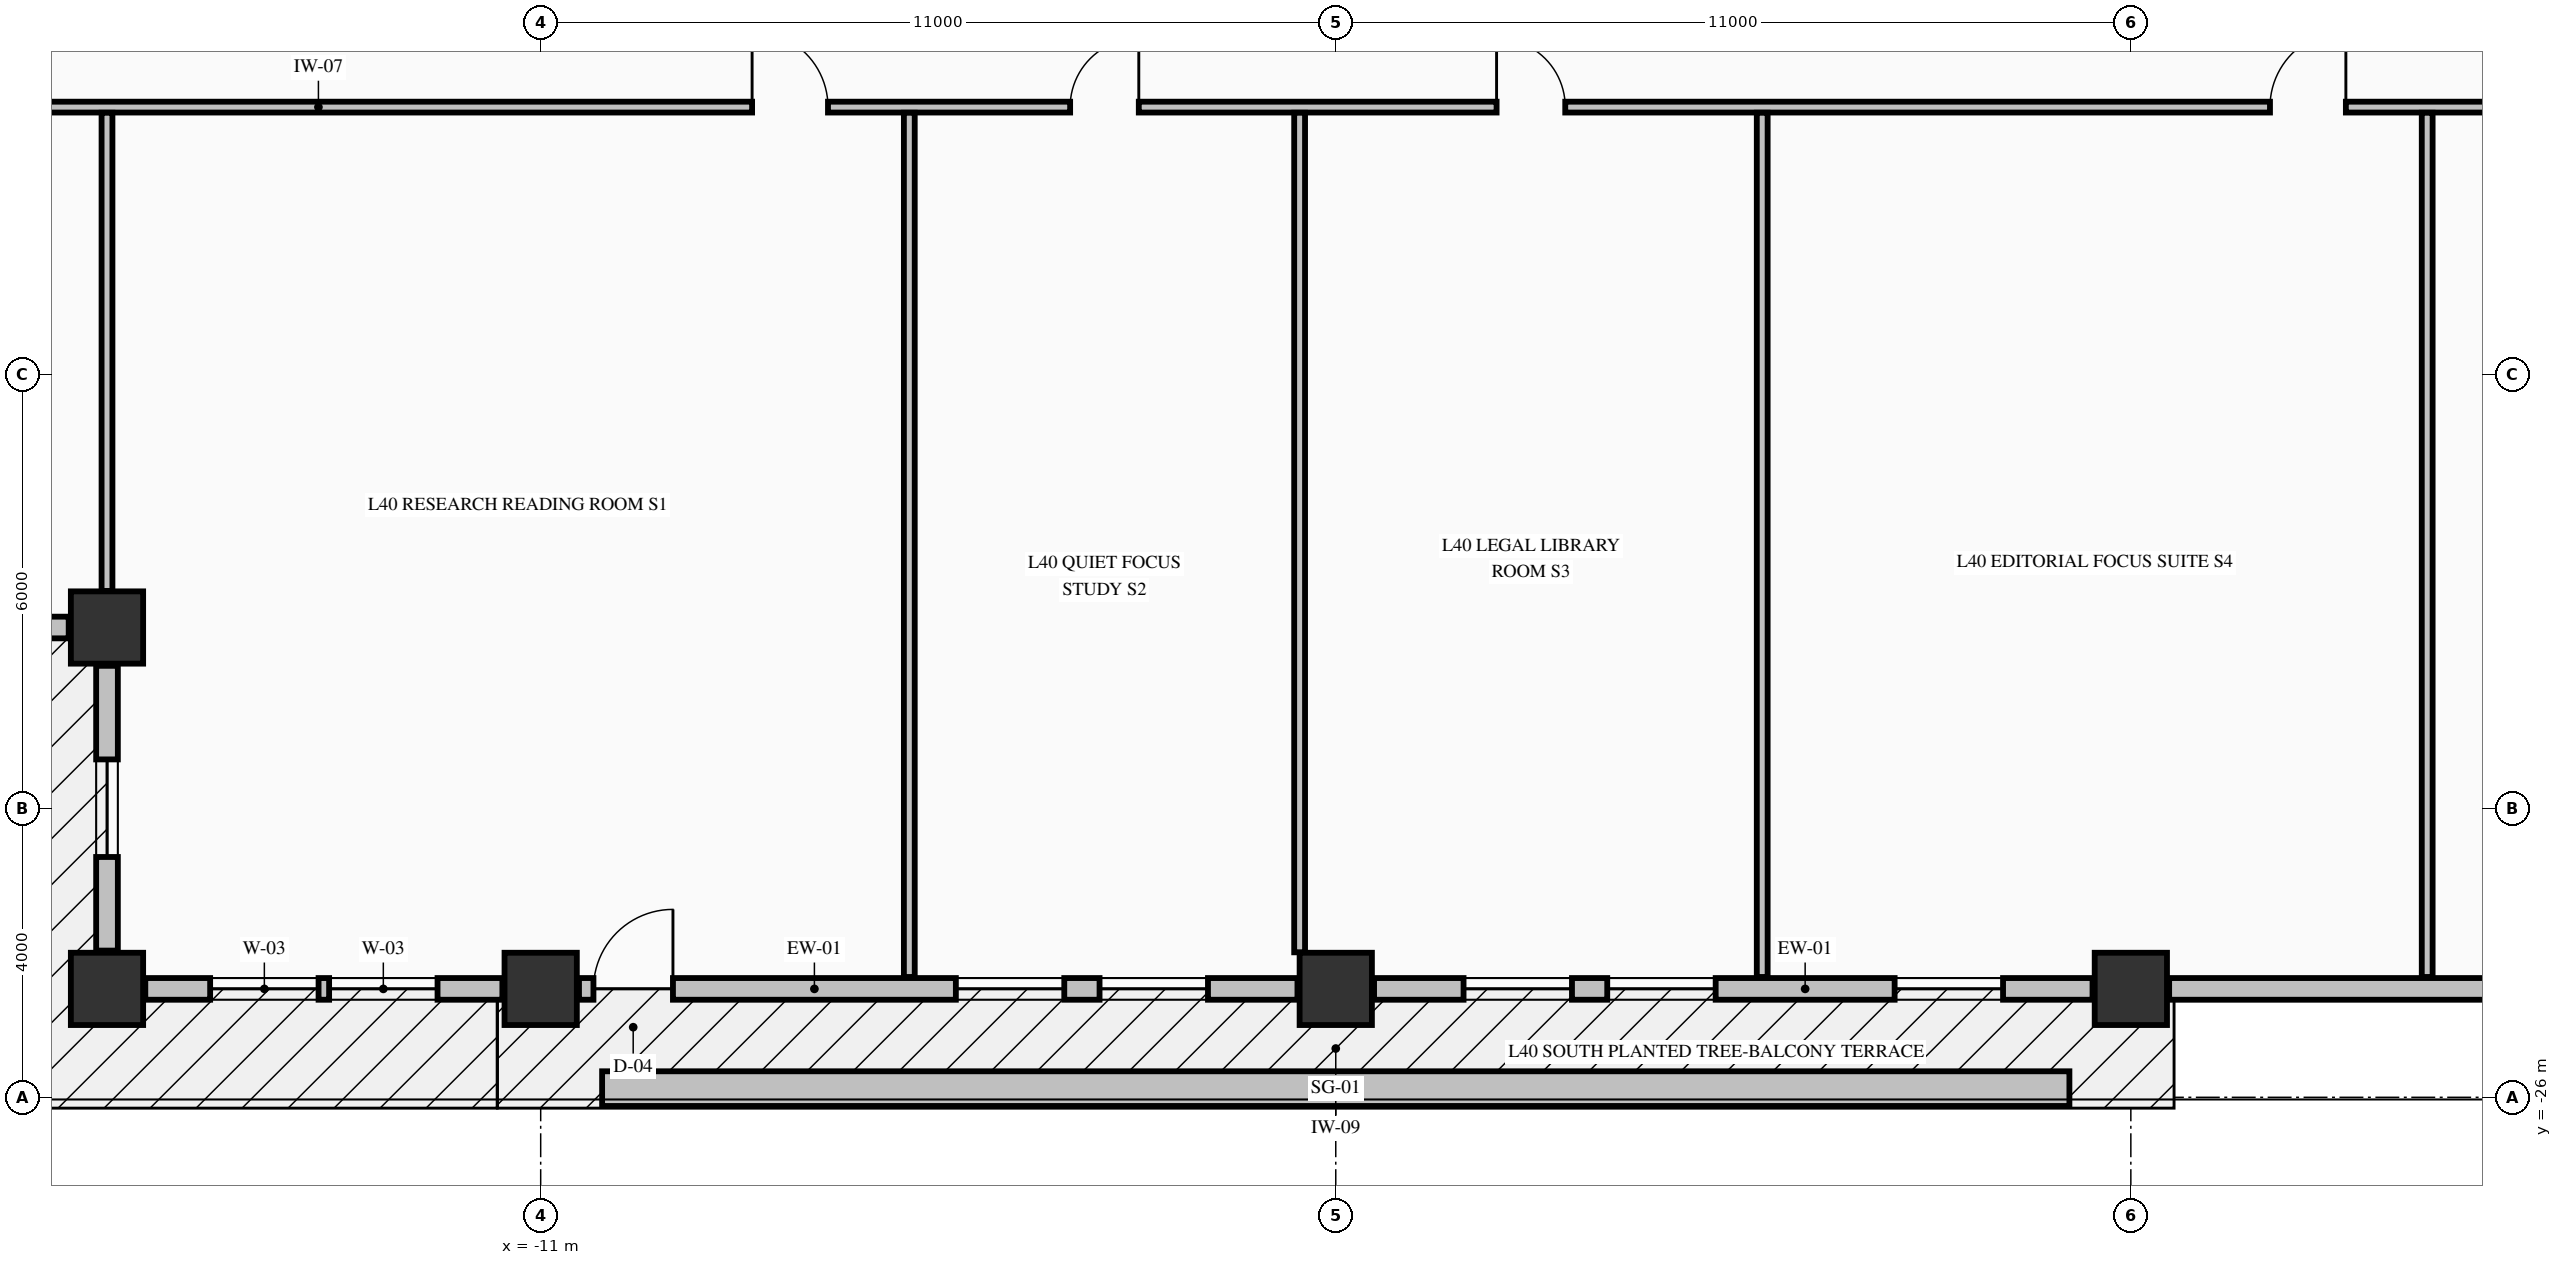
"""IFC4 building model, lengths in metres.
Left out: names, types, materials, properties, quantities, classifications, styles, units other than length and angle.
Written with IfcOpenShell. Run it as: python <this file> out.ifc"""

import sys

from ifc_helpers import new_model, si_unit, direction, frame, frame_2d, origin, origin_2d, place, context, subcontext, project, spatial, rectangle, extrude, element, fill, save


model = new_model("IFC4")
c1 = context("Model", 3, precision=1e-05, world=origin(), true_north=direction((0.0, 1.0)))
c2 = subcontext(c1, "Body", "Model", "MODEL_VIEW")
j1 = project(units=[si_unit("LENGTHUNIT", "METRE"), si_unit("PLANEANGLEUNIT", "RADIAN")], contexts=[c1])
p1 = place(None, origin())
s1 = spatial("IfcSite", under=j1, at=p1, CompositionType="ELEMENT")
p2 = place(p1, origin())
s2 = spatial("IfcBuilding", under=s1, at=p2, CompositionType="ELEMENT")
p3 = place(p2, frame((0.0, 0.0, 158.24)))
s3 = spatial("IfcBuildingStorey", under=s2, at=p3, CompositionType="ELEMENT", Elevation=158.24)
for number, where, z_axis, x_axis in (
    (1, (-17.0, -24.5, -0.425), (0.0, 0.0, 1.0), (1.0, 0.0, 0.0)),
    (2, (-11.0, -24.5, -0.425), (0.0, 0.0, 1.0), (1.0, 0.0, 0.0)),
    (3, (0.0, -24.5, -0.425), (0.0, 0.0, 1.0), (1.0, 0.0, 0.0)),
    (4, (11.0, -24.5, -0.425), (0.0, 0.0, 1.0), (1.0, 0.0, 0.0)),
    (5, (-17.0, -19.5, -0.425), (0.0, 0.0, 1.0), (1.0, 0.0, 0.0)),
):
    element("IfcColumn", number, at=place(p3, frame(where, z_axis=z_axis, x_axis=x_axis)), inside=s3, PredefinedType="COLUMN", context=c2, shape_type="SweptSolid", body=[
        extrude(rectangle(XDim=1.0, YDim=1.0, at=origin_2d()), origin(), (0.0, 0.0, 1.0), 4.595),
    ])
p4 = place(p3, frame((-21.47, -19.5, 0.0), z_axis=(0.0, 0.0, 1.0), x_axis=(1.0, 0.0, 0.0)))
e6 = element("IfcWall", 6, at=p4, inside=s3, PredefinedType="STANDARD", context=c2, shape_type="SweptSolid", body=[
    extrude(rectangle(XDim=3.94, YDim=0.3, at=frame_2d((1.97, 0.0))), origin(), (0.0, 0.0, 1.0), 3.562),
])
p5 = place(p4, frame((1.295, 0.0, 0.68)))
e7 = element("IfcOpeningElement", 7, at=p5, cuts=e6, PredefinedType="OPENING", context=c2, shape_type="SweptSolid", body=[
    extrude(rectangle(XDim=1.35, YDim=1.42, at=frame_2d((0.675, 0.71))), frame((0.0, 0.16, 0.0), z_axis=(0.0, -1.0, 0.0), x_axis=(1.0, 0.0, 0.0)), (0.0, 0.0, 1.0), 0.32),
])
p6 = place(p3, frame((-17.0, -20.03, 0.0), z_axis=(0.0, 0.0, 1.0), x_axis=(0.0, -1.0, 0.0)))
e8 = element("IfcWall", 8, at=p6, inside=s3, PredefinedType="STANDARD", context=c2, shape_type="SweptSolid", body=[
    extrude(rectangle(XDim=3.94, YDim=0.3, at=frame_2d((1.97, 0.0))), origin(), (0.0, 0.0, 1.0), 3.562),
])
p7 = place(p6, frame((1.295, 0.0, 0.68)))
e9 = element("IfcOpeningElement", 9, at=p7, cuts=e8, PredefinedType="OPENING", context=c2, shape_type="SweptSolid", body=[
    extrude(rectangle(XDim=1.35, YDim=1.42, at=frame_2d((0.675, 0.71))), frame((0.0, 0.16, 0.0), z_axis=(0.0, -1.0, 0.0), x_axis=(1.0, 0.0, 0.0)), (0.0, 0.0, 1.0), 0.32),
])
p8 = place(p3, frame((-16.47, -24.5, 0.0), z_axis=(0.0, 0.0, 1.0), x_axis=(1.0, 0.0, 0.0)))
e10 = element("IfcWall", 10, at=p8, inside=s3, PredefinedType="STANDARD", context=c2, shape_type="SweptSolid", body=[
    extrude(rectangle(XDim=4.94, YDim=0.3, at=frame_2d((2.47, 0.0))), origin(), (0.0, 0.0, 1.0), 3.562),
])
p9 = place(p8, frame((0.897, 0.0, 0.72)))
e11 = element("IfcOpeningElement", 11, at=p9, cuts=e10, PredefinedType="OPENING", context=c2, shape_type="SweptSolid", body=[
    extrude(rectangle(XDim=1.5, YDim=1.6, at=frame_2d((0.75, 0.8))), frame((0.0, 0.16, 0.0), z_axis=(0.0, -1.0, 0.0), x_axis=(1.0, 0.0, 0.0)), (0.0, 0.0, 1.0), 0.32),
])
p10 = place(p8, frame((2.543, 0.0, 0.72)))
e12 = element("IfcOpeningElement", 12, at=p10, cuts=e10, PredefinedType="OPENING", context=c2, shape_type="SweptSolid", body=[
    extrude(rectangle(XDim=1.5, YDim=1.6, at=frame_2d((0.75, 0.8))), frame((0.0, 0.16, 0.0), z_axis=(0.0, -1.0, 0.0), x_axis=(1.0, 0.0, 0.0)), (0.0, 0.0, 1.0), 0.32),
])
p11 = place(p3, frame((-10.47, -24.5, 0.0), z_axis=(0.0, 0.0, 1.0), x_axis=(1.0, 0.0, 0.0)))
e13 = element("IfcWall", 13, at=p11, inside=s3, PredefinedType="STANDARD", context=c2, shape_type="SweptSolid", body=[
    extrude(rectangle(XDim=9.94, YDim=0.3, at=frame_2d((4.97, 0.0))), origin(), (0.0, 0.0, 1.0), 3.562),
])
p12 = place(p11, frame((0.2, 0.0, 0.0)))
e14 = element("IfcOpeningElement", 14, at=p12, cuts=e13, PredefinedType="OPENING", context=c2, shape_type="SweptSolid", body=[
    extrude(rectangle(XDim=1.1, YDim=2.15, at=frame_2d((0.55, 1.075))), frame((0.0, 0.16, 0.0), z_axis=(0.0, -1.0, 0.0), x_axis=(1.0, 0.0, 0.0)), (0.0, 0.0, 1.0), 0.32),
])
p13 = place(p11, frame((5.214, 0.0, 0.72)))
e15 = element("IfcOpeningElement", 15, at=p13, cuts=e13, PredefinedType="OPENING", context=c2, shape_type="SweptSolid", body=[
    extrude(rectangle(XDim=1.5, YDim=1.6, at=frame_2d((0.75, 0.8))), frame((0.0, 0.16, 0.0), z_axis=(0.0, -1.0, 0.0), x_axis=(1.0, 0.0, 0.0)), (0.0, 0.0, 1.0), 0.32),
])
p14 = place(p11, frame((7.202, 0.0, 0.72)))
e16 = element("IfcOpeningElement", 16, at=p14, cuts=e13, PredefinedType="OPENING", context=c2, shape_type="SweptSolid", body=[
    extrude(rectangle(XDim=1.5, YDim=1.6, at=frame_2d((0.75, 0.8))), frame((0.0, 0.16, 0.0), z_axis=(0.0, -1.0, 0.0), x_axis=(1.0, 0.0, 0.0)), (0.0, 0.0, 1.0), 0.32),
])
p15 = place(p3, frame((0.53, -24.5, 0.0), z_axis=(0.0, 0.0, 1.0), x_axis=(1.0, 0.0, 0.0)))
e17 = element("IfcWall", 17, at=p15, inside=s3, PredefinedType="STANDARD", context=c2, shape_type="SweptSolid", body=[
    extrude(rectangle(XDim=9.94, YDim=0.3, at=frame_2d((4.97, 0.0))), origin(), (0.0, 0.0, 1.0), 3.562),
])
p16 = place(p15, frame((1.238, 0.0, 0.72)))
e18 = element("IfcOpeningElement", 18, at=p16, cuts=e17, PredefinedType="OPENING", context=c2, shape_type="SweptSolid", body=[
    extrude(rectangle(XDim=1.5, YDim=1.6, at=frame_2d((0.75, 0.8))), frame((0.0, 0.16, 0.0), z_axis=(0.0, -1.0, 0.0), x_axis=(1.0, 0.0, 0.0)), (0.0, 0.0, 1.0), 0.32),
])
p17 = place(p15, frame((3.226, 0.0, 0.72)))
e19 = element("IfcOpeningElement", 19, at=p17, cuts=e17, PredefinedType="OPENING", context=c2, shape_type="SweptSolid", body=[
    extrude(rectangle(XDim=1.5, YDim=1.6, at=frame_2d((0.75, 0.8))), frame((0.0, 0.16, 0.0), z_axis=(0.0, -1.0, 0.0), x_axis=(1.0, 0.0, 0.0)), (0.0, 0.0, 1.0), 0.32),
])
p18 = place(p15, frame((7.202, 0.0, 0.72)))
e20 = element("IfcOpeningElement", 20, at=p18, cuts=e17, PredefinedType="OPENING", context=c2, shape_type="SweptSolid", body=[
    extrude(rectangle(XDim=1.5, YDim=1.6, at=frame_2d((0.75, 0.8))), frame((0.0, 0.16, 0.0), z_axis=(0.0, -1.0, 0.0), x_axis=(1.0, 0.0, 0.0)), (0.0, 0.0, 1.0), 0.32),
])
p19 = place(p3, frame((11.53, -24.5, 0.0), z_axis=(0.0, 0.0, 1.0), x_axis=(1.0, 0.0, 0.0)))
e21 = element("IfcWall", 21, at=p19, inside=s3, PredefinedType="STANDARD", context=c2, shape_type="SweptSolid", body=[
    extrude(rectangle(XDim=9.94, YDim=0.3, at=frame_2d((4.97, 0.0))), origin(), (0.0, 0.0, 1.0), 1.962),
])
p20 = place(p3, frame((-20.075, -12.3, 0.0), z_axis=(0.0, 0.0, 1.0), x_axis=(1.0, 0.0, 0.0)))
e22 = element("IfcWall", 22, at=p20, inside=s3, PredefinedType="PARTITIONING", context=c2, shape_type="SweptSolid", body=[
    extrude(rectangle(XDim=46.91, YDim=0.15, at=frame_2d((23.455, 0.0))), origin(), (0.0, 0.0, 1.0), 4.17),
])
p21 = place(p20, frame((12.0, 0.0, 0.0)))
e23 = element("IfcOpeningElement", 23, at=p21, cuts=e22, PredefinedType="OPENING", context=c2, shape_type="SweptSolid", body=[
    extrude(rectangle(XDim=1.05, YDim=2.15, at=frame_2d((0.525, 1.075))), frame((0.0, 0.085, 0.0), z_axis=(0.0, -1.0, 0.0), x_axis=(1.0, 0.0, 0.0)), (0.0, 0.0, 1.0), 0.17),
])
p22 = place(p20, frame((16.4, 0.0, 0.0)))
e24 = element("IfcOpeningElement", 24, at=p22, cuts=e22, PredefinedType="OPENING", context=c2, shape_type="SweptSolid", body=[
    extrude(rectangle(XDim=0.95, YDim=2.15, at=frame_2d((0.475, 1.075))), frame((0.0, 0.085, 0.0), z_axis=(0.0, -1.0, 0.0), x_axis=(1.0, 0.0, 0.0)), (0.0, 0.0, 1.0), 0.17),
])
p23 = place(p20, frame((22.3, 0.0, 0.0)))
e25 = element("IfcOpeningElement", 25, at=p23, cuts=e22, PredefinedType="OPENING", context=c2, shape_type="SweptSolid", body=[
    extrude(rectangle(XDim=0.95, YDim=2.15, at=frame_2d((0.475, 1.075))), frame((0.0, 0.085, 0.0), z_axis=(0.0, -1.0, 0.0), x_axis=(1.0, 0.0, 0.0)), (0.0, 0.0, 1.0), 0.17),
])
p24 = place(p20, frame((33.0, 0.0, 0.0)))
e26 = element("IfcOpeningElement", 26, at=p24, cuts=e22, PredefinedType="OPENING", context=c2, shape_type="SweptSolid", body=[
    extrude(rectangle(XDim=1.05, YDim=2.15, at=frame_2d((0.525, 1.075))), frame((0.0, 0.085, 0.0), z_axis=(0.0, -1.0, 0.0), x_axis=(1.0, 0.0, 0.0)), (0.0, 0.0, 1.0), 0.17),
])
p25 = place(p20, frame((37.05, 0.0, 0.0)))
e27 = element("IfcOpeningElement", 27, at=p25, cuts=e22, PredefinedType="OPENING", context=c2, shape_type="SweptSolid", body=[
    extrude(rectangle(XDim=0.95, YDim=2.15, at=frame_2d((0.475, 1.075))), frame((0.0, 0.085, 0.0), z_axis=(0.0, -1.0, 0.0), x_axis=(1.0, 0.0, 0.0)), (0.0, 0.0, 1.0), 0.17),
])
p26 = place(p3, frame((-17.0, -18.994, 0.0), z_axis=(0.0, 0.0, 1.0), x_axis=(0.0, 1.0, 0.0)))
e28 = element("IfcWall", 28, at=p26, inside=s3, PredefinedType="PARTITIONING", context=c2, shape_type="SweptSolid", body=[
    extrude(rectangle(XDim=6.616, YDim=0.15, at=frame_2d((3.308, 0.0))), origin(), (0.0, 0.0, 1.0), 4.17),
])
p27 = place(p3, frame((-5.9, -24.335, 0.0), z_axis=(0.0, 0.0, 1.0), x_axis=(0.0, 1.0, 0.0)))
e29 = element("IfcWall", 29, at=p27, inside=s3, PredefinedType="PARTITIONING", context=c2, shape_type="SweptSolid", body=[
    extrude(rectangle(XDim=11.957, YDim=0.15, at=frame_2d((5.979, 0.0))), origin(), (0.0, 0.0, 1.0), 4.17),
])
p28 = place(p3, frame((-0.5, -23.994, 0.0), z_axis=(0.0, 0.0, 1.0), x_axis=(0.0, 1.0, 0.0)))
e30 = element("IfcWall", 30, at=p28, inside=s3, PredefinedType="PARTITIONING", context=c2, shape_type="SweptSolid", body=[
    extrude(rectangle(XDim=11.616, YDim=0.15, at=frame_2d((5.808, 0.0))), origin(), (0.0, 0.0, 1.0), 4.17),
])
for number, where, z_axis, x_axis in (
    (31, (5.9, -24.335, 0.0), (0.0, 0.0, 1.0), (0.0, 1.0, 0.0)),
    (32, (15.1, -24.335, 0.0), (0.0, 0.0, 1.0), (0.0, 1.0, 0.0)),
):
    element("IfcWall", number, at=place(p3, frame(where, z_axis=z_axis, x_axis=x_axis)), inside=s3, PredefinedType="PARTITIONING", context=c2, shape_type="SweptSolid", body=[
        extrude(rectangle(XDim=11.957, YDim=0.15, at=frame_2d((5.979, 0.0))), origin(), (0.0, 0.0, 1.0), 4.17),
    ])
p29 = place(p3, frame((-10.15, -25.88, -0.04), z_axis=(0.0, 0.0, 1.0), x_axis=(1.0, 0.0, 0.0)))
e33 = element("IfcWall", 33, at=p29, inside=s3, PredefinedType="PARAPET", context=c2, shape_type="SweptSolid", body=[
    extrude(rectangle(XDim=20.3, YDim=0.48, at=frame_2d((10.15, 0.0))), origin(), (0.0, 0.0, 1.0), 0.52),
])
p30 = place(p7, origin())
e34 = element("IfcWindow", 34, at=p30, inside=s3, PartitioningType="SINGLE_PANEL", PredefinedType="WINDOW", context=c2, shape_type="SweptSolid", body=[
    extrude(rectangle(XDim=1.35, YDim=1.42, at=frame_2d((0.675, 0.71))), frame((0.0, 0.03, 0.0), z_axis=(0.0, -1.0, 0.0), x_axis=(1.0, 0.0, 0.0)), (0.0, 0.0, 1.0), 0.06),
])
fill(e9, e34)
p31 = place(p9, origin())
e35 = element("IfcWindow", 35, at=p31, inside=s3, PartitioningType="SINGLE_PANEL", PredefinedType="WINDOW", context=c2, shape_type="SweptSolid", body=[
    extrude(rectangle(XDim=1.5, YDim=1.6, at=frame_2d((0.75, 0.8))), frame((0.0, 0.03, 0.0), z_axis=(0.0, -1.0, 0.0), x_axis=(1.0, 0.0, 0.0)), (0.0, 0.0, 1.0), 0.06),
])
fill(e11, e35)
p32 = place(p10, origin())
e36 = element("IfcWindow", 36, at=p32, inside=s3, PartitioningType="SINGLE_PANEL", PredefinedType="WINDOW", context=c2, shape_type="SweptSolid", body=[
    extrude(rectangle(XDim=1.5, YDim=1.6, at=frame_2d((0.75, 0.8))), frame((0.0, 0.03, 0.0), z_axis=(0.0, -1.0, 0.0), x_axis=(1.0, 0.0, 0.0)), (0.0, 0.0, 1.0), 0.06),
])
fill(e12, e36)
p33 = place(p12, origin())
e37 = element("IfcDoor", 37, at=p33, inside=s3, OperationType="SINGLE_SWING_RIGHT", PredefinedType="DOOR", context=c2, shape_type="SweptSolid", body=[
    extrude(rectangle(XDim=1.1, YDim=2.15, at=frame_2d((0.55, 1.075))), frame((0.0, 0.025, 0.0), z_axis=(0.0, -1.0, 0.0), x_axis=(1.0, 0.0, 0.0)), (0.0, 0.0, 1.0), 0.05),
])
fill(e14, e37)
p34 = place(p13, origin())
e38 = element("IfcWindow", 38, at=p34, inside=s3, PartitioningType="SINGLE_PANEL", PredefinedType="WINDOW", context=c2, shape_type="SweptSolid", body=[
    extrude(rectangle(XDim=1.5, YDim=1.6, at=frame_2d((0.75, 0.8))), frame((0.0, 0.03, 0.0), z_axis=(0.0, -1.0, 0.0), x_axis=(1.0, 0.0, 0.0)), (0.0, 0.0, 1.0), 0.06),
])
fill(e15, e38)
p35 = place(p14, origin())
e39 = element("IfcWindow", 39, at=p35, inside=s3, PartitioningType="SINGLE_PANEL", PredefinedType="WINDOW", context=c2, shape_type="SweptSolid", body=[
    extrude(rectangle(XDim=1.5, YDim=1.6, at=frame_2d((0.75, 0.8))), frame((0.0, 0.03, 0.0), z_axis=(0.0, -1.0, 0.0), x_axis=(1.0, 0.0, 0.0)), (0.0, 0.0, 1.0), 0.06),
])
fill(e16, e39)
p36 = place(p16, origin())
e40 = element("IfcWindow", 40, at=p36, inside=s3, PartitioningType="SINGLE_PANEL", PredefinedType="WINDOW", context=c2, shape_type="SweptSolid", body=[
    extrude(rectangle(XDim=1.5, YDim=1.6, at=frame_2d((0.75, 0.8))), frame((0.0, 0.03, 0.0), z_axis=(0.0, -1.0, 0.0), x_axis=(1.0, 0.0, 0.0)), (0.0, 0.0, 1.0), 0.06),
])
fill(e18, e40)
p37 = place(p17, origin())
e41 = element("IfcWindow", 41, at=p37, inside=s3, PartitioningType="SINGLE_PANEL", PredefinedType="WINDOW", context=c2, shape_type="SweptSolid", body=[
    extrude(rectangle(XDim=1.5, YDim=1.6, at=frame_2d((0.75, 0.8))), frame((0.0, 0.03, 0.0), z_axis=(0.0, -1.0, 0.0), x_axis=(1.0, 0.0, 0.0)), (0.0, 0.0, 1.0), 0.06),
])
fill(e19, e41)
p38 = place(p18, origin())
e42 = element("IfcWindow", 42, at=p38, inside=s3, PartitioningType="SINGLE_PANEL", PredefinedType="WINDOW", context=c2, shape_type="SweptSolid", body=[
    extrude(rectangle(XDim=1.5, YDim=1.6, at=frame_2d((0.75, 0.8))), frame((0.0, 0.03, 0.0), z_axis=(0.0, -1.0, 0.0), x_axis=(1.0, 0.0, 0.0)), (0.0, 0.0, 1.0), 0.06),
])
fill(e20, e42)
p39 = place(p21, origin())
e43 = element("IfcDoor", 43, at=p39, inside=s3, OperationType="SINGLE_SWING_LEFT", PredefinedType="DOOR", context=c2, shape_type="SweptSolid", body=[
    extrude(rectangle(XDim=1.05, YDim=2.15, at=frame_2d((0.525, 1.075))), frame((0.0, 0.025, 0.0), z_axis=(0.0, -1.0, 0.0), x_axis=(1.0, 0.0, 0.0)), (0.0, 0.0, 1.0), 0.05),
])
fill(e23, e43)
p40 = place(p22, origin())
e44 = element("IfcDoor", 44, at=p40, inside=s3, OperationType="SINGLE_SWING_RIGHT", PredefinedType="DOOR", context=c2, shape_type="SweptSolid", body=[
    extrude(rectangle(XDim=0.95, YDim=2.15, at=frame_2d((0.475, 1.075))), frame((0.0, 0.025, 0.0), z_axis=(0.0, -1.0, 0.0), x_axis=(1.0, 0.0, 0.0)), (0.0, 0.0, 1.0), 0.05),
])
fill(e24, e44)
p41 = place(p23, origin())
e45 = element("IfcDoor", 45, at=p41, inside=s3, OperationType="SINGLE_SWING_LEFT", PredefinedType="DOOR", context=c2, shape_type="SweptSolid", body=[
    extrude(rectangle(XDim=0.95, YDim=2.15, at=frame_2d((0.475, 1.075))), frame((0.0, 0.025, 0.0), z_axis=(0.0, -1.0, 0.0), x_axis=(1.0, 0.0, 0.0)), (0.0, 0.0, 1.0), 0.05),
])
fill(e25, e45)
p42 = place(p24, origin())
e46 = element("IfcDoor", 46, at=p42, inside=s3, OperationType="SINGLE_SWING_RIGHT", PredefinedType="DOOR", context=c2, shape_type="SweptSolid", body=[
    extrude(rectangle(XDim=1.05, YDim=2.15, at=frame_2d((0.525, 1.075))), frame((0.0, 0.025, 0.0), z_axis=(0.0, -1.0, 0.0), x_axis=(1.0, 0.0, 0.0)), (0.0, 0.0, 1.0), 0.05),
])
fill(e26, e46)
save(model, sys.argv[1])
